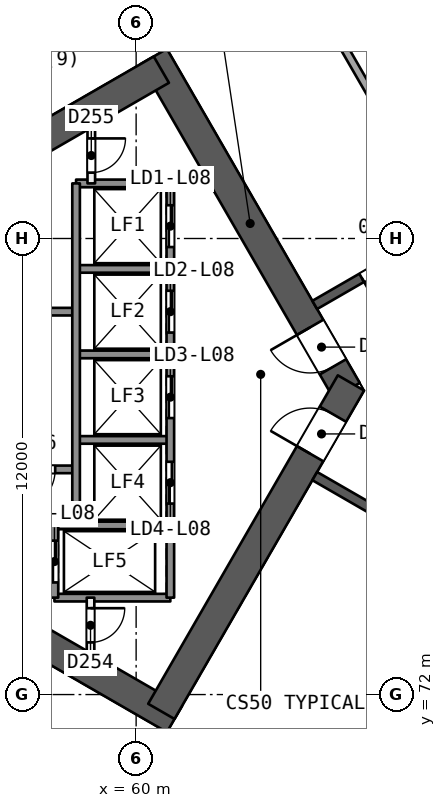
"""IFC4 building model, lengths in metres.
Left out: names, types, materials, properties, quantities, classifications, styles, units other than length and angle.
Written with IfcOpenShell. Run it as: python <this file> out.ifc"""

import sys

from ifc_helpers import new_model, si_unit, direction, frame, frame_2d, origin, place, context, subcontext, project, spatial, rectangle, extrude, element, fill, save


model = new_model("IFC4")
c1 = context("Model", 3, precision=1e-05, world=origin(), true_north=direction((0.0, 1.0)))
c2 = subcontext(c1, "Body", "Model", "MODEL_VIEW")
j1 = project(units=[si_unit("LENGTHUNIT", "METRE"), si_unit("PLANEANGLEUNIT", "RADIAN")], contexts=[c1])
p1 = place(None, origin())
s1 = spatial("IfcSite", under=j1, at=p1, CompositionType="ELEMENT")
p2 = place(p1, origin())
s2 = spatial("IfcBuilding", under=s1, at=p2, CompositionType="ELEMENT")
p3 = place(p2, frame((0.0, 0.0, 41.1)))
s3 = spatial("IfcBuildingStorey", under=s2, at=p3, CompositionType="ELEMENT", Elevation=41.1)
p4 = place(p3, frame((65.538, 80.0, 0.0), z_axis=(0.0, 0.0, 1.0), x_axis=(-0.49999662545, 0.866027352073, 0.0)))
e1 = element("IfcWall", 1, at=p4, inside=s3, PredefinedType="SHEAR", context=c2, shape_type="SweptSolid", body=[
    extrude(rectangle(XDim=10.149, YDim=0.8, at=frame_2d((5.074, 0.0))), origin(), (0.0, 0.0, 1.0), 3.7),
])
p5 = place(p4, frame((0.719, 0.0, 0.0)))
e2 = element("IfcOpeningElement", 2, at=p5, cuts=e1, PredefinedType="OPENING", context=c2, shape_type="SweptSolid", body=[
    extrude(rectangle(XDim=1.2, YDim=2.1, at=frame_2d((0.6, 1.05))), frame((0.0, 0.411, 0.0), z_axis=(0.0, -1.0, 0.0), x_axis=(1.0, 0.0, 0.0)), (0.0, 0.0, 1.0), 0.821),
])
p6 = place(p3, frame((60.664, 88.443, 0.0), z_axis=(0.0, 0.0, 1.0), x_axis=(-0.866029478545, -0.499992942241, 0.0)))
e3 = element("IfcWall", 3, at=p6, inside=s3, PredefinedType="SHEAR", context=c2, shape_type="SweptSolid", body=[
    extrude(rectangle(XDim=13.933, YDim=0.8, at=frame_2d((6.967, 0.0))), origin(), (0.0, 0.0, 1.0), 3.7),
])
p7 = place(p3, frame((48.797, 78.408, 0.0), z_axis=(0.0, 0.0, 1.0), x_axis=(0.866032504327, -0.499987701298, 0.0)))
e4 = element("IfcWall", 4, at=p7, inside=s3, PredefinedType="SHEAR", context=c2, shape_type="SweptSolid", body=[
    extrude(rectangle(XDim=14.102, YDim=0.8, at=frame_2d((7.051, 0.0))), origin(), (0.0, 0.0, 1.0), 3.7),
])
p8 = place(p3, frame((60.664, 71.557, 0.0), z_axis=(0.0, 0.0, 1.0), x_axis=(0.50000409368, 0.866023040284, 0.0)))
e5 = element("IfcWall", 5, at=p8, inside=s3, PredefinedType="SHEAR", context=c2, shape_type="SweptSolid", body=[
    extrude(rectangle(XDim=9.98, YDim=0.8, at=frame_2d((4.99, 0.0))), origin(), (0.0, 0.0, 1.0), 3.7),
])
p9 = place(p8, frame((7.83, 0.0, 0.0)))
e6 = element("IfcOpeningElement", 6, at=p9, cuts=e5, PredefinedType="OPENING", context=c2, shape_type="SweptSolid", body=[
    extrude(rectangle(XDim=1.2, YDim=2.1, at=frame_2d((0.6, 1.05))), frame((0.0, 0.411, 0.0), z_axis=(0.0, -1.0, 0.0), x_axis=(1.0, 0.0, 0.0)), (0.0, 0.0, 1.0), 0.821),
])
p10 = place(p3, frame((78.2, 90.046, 0.0), z_axis=(0.0, 0.0, 1.0), x_axis=(-0.866026492143, -0.499998114903, 0.0)))
e7 = element("IfcWall", 7, at=p10, inside=s3, PredefinedType="SHEAR", context=c2, shape_type="SweptSolid", body=[
    extrude(rectangle(XDim=15.588, YDim=0.25, at=frame_2d((7.794, 0.0))), origin(), (0.0, 0.0, 1.0), 3.2),
])
p11 = place(p10, frame((1.838, 0.0, 0.0)))
e8 = element("IfcOpeningElement", 8, at=p11, cuts=e7, PredefinedType="OPENING", context=c2, shape_type="SweptSolid", body=[
    extrude(rectangle(XDim=1.0, YDim=2.1, at=frame_2d((0.5, 1.05))), frame((0.0, 0.135, 0.0), z_axis=(0.0, -1.0, 0.0), x_axis=(1.0, 0.0, 0.0)), (0.0, 0.0, 1.0), 0.271),
])
p12 = place(p10, frame((9.706, 0.0, 0.0)))
e9 = element("IfcOpeningElement", 9, at=p12, cuts=e7, PredefinedType="OPENING", context=c2, shape_type="SweptSolid", body=[
    extrude(rectangle(XDim=1.0, YDim=2.1, at=frame_2d((0.5, 1.05))), frame((0.0, 0.135, 0.0), z_axis=(0.0, -1.0, 0.0), x_axis=(1.0, 0.0, 0.0)), (0.0, 0.0, 1.0), 0.271),
])
p13 = place(p10, frame((12.962, 0.0, 0.0)))
e10 = element("IfcOpeningElement", 10, at=p13, cuts=e7, PredefinedType="OPENING", context=c2, shape_type="SweptSolid", body=[
    extrude(rectangle(XDim=1.2, YDim=2.4, at=frame_2d((0.6, 1.2))), frame((0.0, 0.135, 0.0), z_axis=(0.0, -1.0, 0.0), x_axis=(1.0, 0.0, 0.0)), (0.0, 0.0, 1.0), 0.271),
])
p14 = place(p3, frame((64.7, 77.748, 0.0), z_axis=(0.0, 0.0, 1.0), x_axis=(0.866026492143, -0.499998114903, 0.0)))
e11 = element("IfcWall", 11, at=p14, inside=s3, PredefinedType="SHEAR", context=c2, shape_type="SweptSolid", body=[
    extrude(rectangle(XDim=15.588, YDim=0.25, at=frame_2d((7.794, 0.0))), origin(), (0.0, 0.0, 1.0), 3.2),
])
p15 = place(p14, frame((2.462, 0.0, 0.0)))
e12 = element("IfcOpeningElement", 12, at=p15, cuts=e11, PredefinedType="OPENING", context=c2, shape_type="SweptSolid", body=[
    extrude(rectangle(XDim=1.0, YDim=2.1, at=frame_2d((0.5, 1.05))), frame((0.0, 0.135, 0.0), z_axis=(0.0, -1.0, 0.0), x_axis=(1.0, 0.0, 0.0)), (0.0, 0.0, 1.0), 0.271),
])
p16 = place(p14, frame((8.315, 0.0, 0.0)))
e13 = element("IfcOpeningElement", 13, at=p16, cuts=e11, PredefinedType="OPENING", context=c2, shape_type="SweptSolid", body=[
    extrude(rectangle(XDim=1.1, YDim=2.1, at=frame_2d((0.55, 1.05))), frame((0.0, 0.135, 0.0), z_axis=(0.0, -1.0, 0.0), x_axis=(1.0, 0.0, 0.0)), (0.0, 0.0, 1.0), 0.271),
])
p17 = place(p14, frame((10.827, 0.0, 0.0)))
e14 = element("IfcOpeningElement", 14, at=p17, cuts=e11, PredefinedType="OPENING", context=c2, shape_type="SweptSolid", body=[
    extrude(rectangle(XDim=1.0, YDim=2.1, at=frame_2d((0.5, 1.05))), frame((0.0, 0.135, 0.0), z_axis=(0.0, -1.0, 0.0), x_axis=(1.0, 0.0, 0.0)), (0.0, 0.0, 1.0), 0.271),
])
p18 = place(p3, frame((61.197, 96.426, 0.0), z_axis=(0.0, 0.0, 1.0), x_axis=(0.499997162821, -0.866027041824, 0.0)))
e15 = element("IfcWall", 15, at=p18, inside=s3, PredefinedType="PARTITIONING", context=c2, shape_type="SweptSolid", body=[
    extrude(rectangle(XDim=14.027, YDim=0.2, at=frame_2d((7.013, 0.0))), origin(), (0.0, 0.0, 1.0), 3.2),
])
p19 = place(p3, frame((62.817, 62.639, 0.0), z_axis=(0.0, 0.0, 1.0), x_axis=(0.499984050028, 0.866034612309, 0.0)))
e16 = element("IfcWall", 16, at=p19, inside=s3, PredefinedType="PARTITIONING", context=c2, shape_type="SweptSolid", body=[
    extrude(rectangle(XDim=9.964, YDim=0.2, at=frame_2d((4.982, 0.0))), origin(), (0.0, 0.0, 1.0), 3.2),
])
p20 = place(p3, frame((66.057, 60.768, 0.0), z_axis=(0.0, 0.0, 1.0), x_axis=(0.499997162821, 0.866027041824, 0.0)))
e17 = element("IfcWall", 17, at=p20, inside=s3, PredefinedType="PARTITIONING", context=c2, shape_type="SweptSolid", body=[
    extrude(rectangle(XDim=14.027, YDim=0.2, at=frame_2d((7.013, 0.0))), origin(), (0.0, 0.0, 1.0), 3.2),
])
p21 = place(p3, frame((37.87, 83.13, 0.0), z_axis=(0.0, 0.0, 1.0), x_axis=(0.866026630825, 0.499997874697, 0.0)))
e18 = element("IfcWall", 18, at=p21, inside=s3, PredefinedType="SOLIDWALL", context=c2, shape_type="SweptSolid", body=[
    extrude(rectangle(XDim=61.18, YDim=0.3, at=frame_2d((30.59, 0.0))), origin(), (0.0, 0.0, 1.0), 3.2),
])
p22 = place(p21, frame((12.181, 0.0, 0.0)))
e19 = element("IfcOpeningElement", 19, at=p22, cuts=e18, PredefinedType="OPENING", context=c2, shape_type="SweptSolid", body=[
    extrude(rectangle(XDim=2.4, YDim=2.4, at=frame_2d((1.2, 1.2))), frame((0.0, 0.161, 0.0), z_axis=(0.0, -1.0, 0.0), x_axis=(1.0, 0.0, 0.0)), (0.0, 0.0, 1.0), 0.321),
])
p23 = place(p21, frame((34.846, 0.0, 0.0)))
e20 = element("IfcOpeningElement", 20, at=p23, cuts=e18, PredefinedType="OPENING", context=c2, shape_type="SweptSolid", body=[
    extrude(rectangle(XDim=2.4, YDim=2.4, at=frame_2d((1.2, 1.2))), frame((0.0, 0.161, 0.0), z_axis=(0.0, -1.0, 0.0), x_axis=(1.0, 0.0, 0.0)), (0.0, 0.0, 1.0), 0.321),
])
p24 = place(p21, frame((47.439, 0.0, 0.0)))
e21 = element("IfcOpeningElement", 21, at=p24, cuts=e18, PredefinedType="OPENING", context=c2, shape_type="SweptSolid", body=[
    extrude(rectangle(XDim=2.4, YDim=2.4, at=frame_2d((1.2, 1.2))), frame((0.0, 0.161, 0.0), z_axis=(0.0, -1.0, 0.0), x_axis=(1.0, 0.0, 0.0)), (0.0, 0.0, 1.0), 0.321),
])
p25 = place(p21, frame((29.078, 0.0, 0.0)))
e22 = element("IfcOpeningElement", 22, at=p25, cuts=e18, PredefinedType="OPENING", context=c2, shape_type="SweptSolid", body=[
    extrude(rectangle(XDim=2.4, YDim=2.4, at=frame_2d((1.2, 1.2))), frame((0.0, 0.161, 0.0), z_axis=(0.0, -1.0, 0.0), x_axis=(1.0, 0.0, 0.0)), (0.0, 0.0, 1.0), 0.321),
])
p26 = place(p3, frame((90.854, 46.28, 0.0), z_axis=(0.0, 0.0, 1.0), x_axis=(-0.866026630825, 0.499997874697, 0.0)))
e23 = element("IfcWall", 23, at=p26, inside=s3, PredefinedType="SOLIDWALL", context=c2, shape_type="SweptSolid", body=[
    extrude(rectangle(XDim=61.18, YDim=0.3, at=frame_2d((30.59, 0.0))), origin(), (0.0, 0.0, 1.0), 3.2),
])
p27 = place(p26, frame((29.39, 0.0, 0.0)))
e24 = element("IfcOpeningElement", 24, at=p27, cuts=e23, PredefinedType="OPENING", context=c2, shape_type="SweptSolid", body=[
    extrude(rectangle(XDim=2.4, YDim=2.4, at=frame_2d((1.2, 1.2))), frame((0.0, 0.161, 0.0), z_axis=(0.0, -1.0, 0.0), x_axis=(1.0, 0.0, 0.0)), (0.0, 0.0, 1.0), 0.321),
])
p28 = place(p26, frame((34.223, 0.0, 0.0)))
e25 = element("IfcOpeningElement", 25, at=p28, cuts=e23, PredefinedType="OPENING", context=c2, shape_type="SweptSolid", body=[
    extrude(rectangle(XDim=2.4, YDim=2.4, at=frame_2d((1.2, 1.2))), frame((0.0, 0.161, 0.0), z_axis=(0.0, -1.0, 0.0), x_axis=(1.0, 0.0, 0.0)), (0.0, 0.0, 1.0), 0.321),
])
p29 = place(p26, frame((47.439, 0.0, 0.0)))
e26 = element("IfcOpeningElement", 26, at=p29, cuts=e23, PredefinedType="OPENING", context=c2, shape_type="SweptSolid", body=[
    extrude(rectangle(XDim=2.4, YDim=2.4, at=frame_2d((1.2, 1.2))), frame((0.0, 0.161, 0.0), z_axis=(0.0, -1.0, 0.0), x_axis=(1.0, 0.0, 0.0)), (0.0, 0.0, 1.0), 0.321),
])
p30 = place(p26, frame((13.116, 0.0, 0.0)))
e27 = element("IfcOpeningElement", 27, at=p30, cuts=e23, PredefinedType="OPENING", context=c2, shape_type="SweptSolid", body=[
    extrude(rectangle(XDim=2.4, YDim=2.4, at=frame_2d((1.2, 1.2))), frame((0.0, 0.161, 0.0), z_axis=(0.0, -1.0, 0.0), x_axis=(1.0, 0.0, 0.0)), (0.0, 0.0, 1.0), 0.321),
])
for number, where, z_axis, x_axis in (
    (28, (60.9, 85.45, 0.0), (0.0, 0.0, 1.0), (-1.0, 0.0, 0.0)),
    (29, (60.9, 83.2, 0.0), (0.0, 0.0, 1.0), (-1.0, 0.0, 0.0)),
):
    element("IfcWall", number, at=place(p3, frame(where, z_axis=z_axis, x_axis=x_axis)), inside=s3, PredefinedType="SOLIDWALL", context=c2, shape_type="SweptSolid", body=[
        extrude(rectangle(XDim=2.48, YDim=0.2, at=frame_2d((1.24, 0.0))), origin(), (0.0, 0.0, 1.0), 3.2),
    ])
p31 = place(p3, frame((58.42, 82.075, 0.0), z_axis=(0.0, 0.0, 1.0), x_axis=(-1.0, 0.0, 0.0)))
e30 = element("IfcWall", 30, at=p31, inside=s3, PredefinedType="SOLIDWALL", context=c2, shape_type="SweptSolid", body=[
    extrude(rectangle(XDim=7.7, YDim=0.2, at=frame_2d((3.85, 0.0))), origin(), (0.0, 0.0, 1.0), 3.2),
])
for number, where, z_axis, x_axis in (
    (31, (60.9, 80.95, 0.0), (0.0, 0.0, 1.0), (-1.0, 0.0, 0.0)),
    (32, (60.9, 78.7, 0.0), (0.0, 0.0, 1.0), (-1.0, 0.0, 0.0)),
):
    element("IfcWall", number, at=place(p3, frame(where, z_axis=z_axis, x_axis=x_axis)), inside=s3, PredefinedType="SOLIDWALL", context=c2, shape_type="SweptSolid", body=[
        extrude(rectangle(XDim=2.48, YDim=0.2, at=frame_2d((1.24, 0.0))), origin(), (0.0, 0.0, 1.0), 3.2),
    ])
p32 = place(p3, frame((58.42, 77.925, 0.0), z_axis=(0.0, 0.0, 1.0), x_axis=(-1.0, 0.0, 0.0)))
e33 = element("IfcWall", 33, at=p32, inside=s3, PredefinedType="SOLIDWALL", context=c2, shape_type="SweptSolid", body=[
    extrude(rectangle(XDim=7.7, YDim=0.2, at=frame_2d((3.85, 0.0))), origin(), (0.0, 0.0, 1.0), 3.2),
])
p33 = place(p32, frame((0.55, 0.0, 0.0)))
e34 = element("IfcOpeningElement", 34, at=p33, cuts=e33, PredefinedType="OPENING", context=c2, shape_type="SweptSolid", body=[
    extrude(rectangle(XDim=1.1, YDim=2.1, at=frame_2d((0.55, 1.05))), frame((0.0, 0.11, 0.0), z_axis=(0.0, -1.0, 0.0), x_axis=(1.0, 0.0, 0.0)), (0.0, 0.0, 1.0), 0.221),
])
for number, where, z_axis, x_axis in (
    (35, (60.9, 76.45, 0.0), (0.0, 0.0, 1.0), (-1.0, 0.0, 0.0)),
    (36, (60.9, 74.55, 0.0), (0.0, 0.0, 1.0), (-1.0, 0.0, 0.0)),
):
    element("IfcWall", number, at=place(p3, frame(where, z_axis=z_axis, x_axis=x_axis)), inside=s3, PredefinedType="SOLIDWALL", context=c2, shape_type="SweptSolid", body=[
        extrude(rectangle(XDim=3.05, YDim=0.2, at=frame_2d((1.525, 0.0))), origin(), (0.0, 0.0, 1.0), 3.2),
    ])
p34 = place(p3, frame((60.9, 85.45, 0.0), z_axis=(0.0, 0.0, 1.0), x_axis=(0.0, -1.0, 0.0)))
e37 = element("IfcWall", 37, at=p34, inside=s3, PredefinedType="SOLIDWALL", context=c2, shape_type="SweptSolid", body=[
    extrude(rectangle(XDim=10.9, YDim=0.2, at=frame_2d((5.45, 0.0))), origin(), (0.0, 0.0, 1.0), 3.2),
])
p35 = place(p34, frame((0.575, 0.0, 0.0)))
e38 = element("IfcOpeningElement", 38, at=p35, cuts=e37, PredefinedType="OPENING", context=c2, shape_type="SweptSolid", body=[
    extrude(rectangle(XDim=1.1, YDim=2.1, at=frame_2d((0.55, 1.05))), frame((0.0, 0.11, 0.0), z_axis=(0.0, -1.0, 0.0), x_axis=(1.0, 0.0, 0.0)), (0.0, 0.0, 1.0), 0.221),
])
p36 = place(p34, frame((2.825, 0.0, 0.0)))
e39 = element("IfcOpeningElement", 39, at=p36, cuts=e37, PredefinedType="OPENING", context=c2, shape_type="SweptSolid", body=[
    extrude(rectangle(XDim=1.1, YDim=2.1, at=frame_2d((0.55, 1.05))), frame((0.0, 0.11, 0.0), z_axis=(0.0, -1.0, 0.0), x_axis=(1.0, 0.0, 0.0)), (0.0, 0.0, 1.0), 0.221),
])
p37 = place(p34, frame((5.075, 0.0, 0.0)))
e40 = element("IfcOpeningElement", 40, at=p37, cuts=e37, PredefinedType="OPENING", context=c2, shape_type="SweptSolid", body=[
    extrude(rectangle(XDim=1.1, YDim=2.1, at=frame_2d((0.55, 1.05))), frame((0.0, 0.11, 0.0), z_axis=(0.0, -1.0, 0.0), x_axis=(1.0, 0.0, 0.0)), (0.0, 0.0, 1.0), 0.221),
])
p38 = place(p34, frame((7.325, 0.0, 0.0)))
e41 = element("IfcOpeningElement", 41, at=p38, cuts=e37, PredefinedType="OPENING", context=c2, shape_type="SweptSolid", body=[
    extrude(rectangle(XDim=1.1, YDim=2.1, at=frame_2d((0.55, 1.05))), frame((0.0, 0.11, 0.0), z_axis=(0.0, -1.0, 0.0), x_axis=(1.0, 0.0, 0.0)), (0.0, 0.0, 1.0), 0.221),
])
p39 = place(p3, frame((58.82, 86.917, 0.0), z_axis=(0.0, 0.0, 1.0), x_axis=(0.0, -1.0, 0.0)))
e42 = element("IfcWall", 42, at=p39, inside=s3, PredefinedType="PARTITIONING", context=c2, shape_type="SweptSolid", body=[
    extrude(rectangle(XDim=1.467, YDim=0.2, at=frame_2d((0.733, 0.0))), origin(), (0.0, 0.0, 1.0), 3.2),
])
p40 = place(p39, frame((0.283, 0.0, 0.0)))
e43 = element("IfcOpeningElement", 43, at=p40, cuts=e42, PredefinedType="OPENING", context=c2, shape_type="SweptSolid", body=[
    extrude(rectangle(XDim=0.9, YDim=2.1, at=frame_2d((0.45, 1.05))), frame((0.0, 0.11, 0.0), z_axis=(0.0, -1.0, 0.0), x_axis=(1.0, 0.0, 0.0)), (0.0, 0.0, 1.0), 0.221),
])
p41 = place(p3, frame((58.8, 74.55, 0.0), z_axis=(0.0, 0.0, 1.0), x_axis=(0.0, -1.0, 0.0)))
e44 = element("IfcWall", 44, at=p41, inside=s3, PredefinedType="PARTITIONING", context=c2, shape_type="SweptSolid", body=[
    extrude(rectangle(XDim=1.455, YDim=0.2, at=frame_2d((0.728, 0.0))), origin(), (0.0, 0.0, 1.0), 3.2),
])
p42 = place(p41, frame((0.278, 0.0, 0.0)))
e45 = element("IfcOpeningElement", 45, at=p42, cuts=e44, PredefinedType="OPENING", context=c2, shape_type="SweptSolid", body=[
    extrude(rectangle(XDim=0.9, YDim=2.1, at=frame_2d((0.45, 1.05))), frame((0.0, 0.11, 0.0), z_axis=(0.0, -1.0, 0.0), x_axis=(1.0, 0.0, 0.0)), (0.0, 0.0, 1.0), 0.221),
])
p43 = place(p3, frame((58.42, 85.45, 0.0), z_axis=(0.0, 0.0, 1.0), x_axis=(0.0, -1.0, 0.0)))
e46 = element("IfcWall", 46, at=p43, inside=s3, PredefinedType="SOLIDWALL", context=c2, shape_type="SweptSolid", body=[
    extrude(rectangle(XDim=9.0, YDim=0.2, at=frame_2d((4.5, 0.0))), origin(), (0.0, 0.0, 1.0), 3.2),
])
p44 = place(p3, frame((57.85, 76.45, 0.0), z_axis=(0.0, 0.0, 1.0), x_axis=(0.0, -1.0, 0.0)))
e47 = element("IfcWall", 47, at=p44, inside=s3, PredefinedType="SOLIDWALL", context=c2, shape_type="SweptSolid", body=[
    extrude(rectangle(XDim=1.9, YDim=0.2, at=frame_2d((0.95, 0.0))), origin(), (0.0, 0.0, 1.0), 3.2),
])
p45 = place(p44, frame((0.4, 0.0, 0.0)))
e48 = element("IfcOpeningElement", 48, at=p45, cuts=e47, PredefinedType="OPENING", context=c2, shape_type="SweptSolid", body=[
    extrude(rectangle(XDim=1.1, YDim=2.1, at=frame_2d((0.55, 1.05))), frame((0.0, 0.11, 0.0), z_axis=(0.0, -1.0, 0.0), x_axis=(1.0, 0.0, 0.0)), (0.0, 0.0, 1.0), 0.221),
])
p46 = place(p13, origin())
e49 = element("IfcDoor", 49, at=p46, inside=s3, OperationType="SINGLE_SWING_RIGHT", PredefinedType="NOTDEFINED", context=c2, shape_type="SweptSolid", body=[
    extrude(rectangle(XDim=1.2, YDim=2.4, at=frame_2d((0.6, 1.2))), frame((0.0, 0.025, 0.0), z_axis=(0.0, -1.0, 0.0), x_axis=(1.0, 0.0, 0.0)), (0.0, 0.0, 1.0), 0.05),
])
fill(e10, e49)
p47 = place(p5, origin())
e50 = element("IfcDoor", 50, at=p47, inside=s3, OperationType="SINGLE_SWING_RIGHT", PredefinedType="NOTDEFINED", context=c2, shape_type="SweptSolid", body=[
    extrude(rectangle(XDim=1.2, YDim=2.1, at=frame_2d((0.6, 1.05))), frame((0.0, 0.025, 0.0), z_axis=(0.0, -1.0, 0.0), x_axis=(1.0, 0.0, 0.0)), (0.0, 0.0, 1.0), 0.05),
])
fill(e2, e50)
p48 = place(p9, origin())
e51 = element("IfcDoor", 51, at=p48, inside=s3, OperationType="SINGLE_SWING_LEFT", PredefinedType="NOTDEFINED", context=c2, shape_type="SweptSolid", body=[
    extrude(rectangle(XDim=1.2, YDim=2.1, at=frame_2d((0.6, 1.05))), frame((0.0, 0.025, 0.0), z_axis=(0.0, -1.0, 0.0), x_axis=(1.0, 0.0, 0.0)), (0.0, 0.0, 1.0), 0.05),
])
fill(e6, e51)
p49 = place(p35, origin())
e52 = element("IfcDoor", 52, at=p49, inside=s3, OperationType="SLIDING_TO_RIGHT", PredefinedType="NOTDEFINED", context=c2, shape_type="SweptSolid", body=[
    extrude(rectangle(XDim=1.1, YDim=2.1, at=frame_2d((0.55, 1.05))), frame((0.0, 0.025, 0.0), z_axis=(0.0, -1.0, 0.0), x_axis=(1.0, 0.0, 0.0)), (0.0, 0.0, 1.0), 0.05),
])
fill(e38, e52)
p50 = place(p36, origin())
e53 = element("IfcDoor", 53, at=p50, inside=s3, OperationType="SLIDING_TO_LEFT", PredefinedType="NOTDEFINED", context=c2, shape_type="SweptSolid", body=[
    extrude(rectangle(XDim=1.1, YDim=2.1, at=frame_2d((0.55, 1.05))), frame((0.0, 0.025, 0.0), z_axis=(0.0, -1.0, 0.0), x_axis=(1.0, 0.0, 0.0)), (0.0, 0.0, 1.0), 0.05),
])
fill(e39, e53)
p51 = place(p37, origin())
e54 = element("IfcDoor", 54, at=p51, inside=s3, OperationType="SLIDING_TO_RIGHT", PredefinedType="NOTDEFINED", context=c2, shape_type="SweptSolid", body=[
    extrude(rectangle(XDim=1.1, YDim=2.1, at=frame_2d((0.55, 1.05))), frame((0.0, 0.025, 0.0), z_axis=(0.0, -1.0, 0.0), x_axis=(1.0, 0.0, 0.0)), (0.0, 0.0, 1.0), 0.05),
])
fill(e40, e54)
p52 = place(p38, origin())
e55 = element("IfcDoor", 55, at=p52, inside=s3, OperationType="SLIDING_TO_LEFT", PredefinedType="NOTDEFINED", context=c2, shape_type="SweptSolid", body=[
    extrude(rectangle(XDim=1.1, YDim=2.1, at=frame_2d((0.55, 1.05))), frame((0.0, 0.025, 0.0), z_axis=(0.0, -1.0, 0.0), x_axis=(1.0, 0.0, 0.0)), (0.0, 0.0, 1.0), 0.05),
])
fill(e41, e55)
p53 = place(p45, origin())
e56 = element("IfcDoor", 56, at=p53, inside=s3, OperationType="SLIDING_TO_RIGHT", PredefinedType="NOTDEFINED", context=c2, shape_type="SweptSolid", body=[
    extrude(rectangle(XDim=1.1, YDim=2.1, at=frame_2d((0.55, 1.05))), frame((0.0, 0.025, 0.0), z_axis=(0.0, -1.0, 0.0), x_axis=(1.0, 0.0, 0.0)), (0.0, 0.0, 1.0), 0.05),
])
fill(e48, e56)
p54 = place(p42, origin())
e57 = element("IfcDoor", 57, at=p54, inside=s3, OperationType="SINGLE_SWING_LEFT", PredefinedType="NOTDEFINED", context=c2, shape_type="SweptSolid", body=[
    extrude(rectangle(XDim=0.9, YDim=2.1, at=frame_2d((0.45, 1.05))), frame((0.0, 0.025, 0.0), z_axis=(0.0, -1.0, 0.0), x_axis=(1.0, 0.0, 0.0)), (0.0, 0.0, 1.0), 0.05),
])
fill(e45, e57)
p55 = place(p40, origin())
e58 = element("IfcDoor", 58, at=p55, inside=s3, OperationType="SINGLE_SWING_LEFT", PredefinedType="NOTDEFINED", context=c2, shape_type="SweptSolid", body=[
    extrude(rectangle(XDim=0.9, YDim=2.1, at=frame_2d((0.45, 1.05))), frame((0.0, 0.025, 0.0), z_axis=(0.0, -1.0, 0.0), x_axis=(1.0, 0.0, 0.0)), (0.0, 0.0, 1.0), 0.05),
])
fill(e43, e58)
p56 = place(p33, origin())
e59 = element("IfcDoor", 59, at=p56, inside=s3, OperationType="SINGLE_SWING_RIGHT", PredefinedType="NOTDEFINED", context=c2, shape_type="SweptSolid", body=[
    extrude(rectangle(XDim=1.1, YDim=2.1, at=frame_2d((0.55, 1.05))), frame((0.0, 0.025, 0.0), z_axis=(0.0, -1.0, 0.0), x_axis=(1.0, 0.0, 0.0)), (0.0, 0.0, 1.0), 0.05),
])
fill(e34, e59)
save(model, sys.argv[1])
